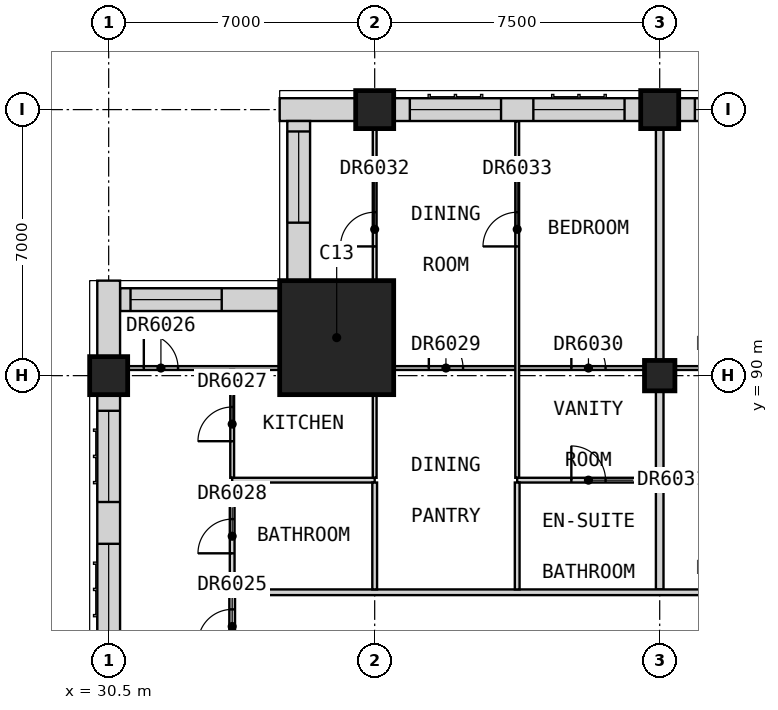
"""IFC4 building model, lengths in metres.
Left out: names, types, materials, properties, quantities, classifications, styles, units other than length and angle.
Written with IfcOpenShell. Run it as: python <this file> out.ifc"""

import sys

from ifc_helpers import new_model, si_unit, direction, frame, frame_2d, origin, origin_2d, place, context, subcontext, project, spatial, rectangle, extrude, element, fill, save


model = new_model("IFC4")
c1 = context("Model", 3, precision=1e-05, world=origin(), true_north=direction((0.0, 1.0)))
c2 = subcontext(c1, "Body", "Model", "MODEL_VIEW")
j1 = project(units=[si_unit("LENGTHUNIT", "METRE"), si_unit("PLANEANGLEUNIT", "RADIAN")], contexts=[c1])
p1 = place(None, origin())
s1 = spatial("IfcSite", under=j1, at=p1, CompositionType="ELEMENT")
p2 = place(p1, origin())
s2 = spatial("IfcBuilding", under=s1, at=p2, CompositionType="ELEMENT")
p3 = place(p2, frame((0.0, 0.0, 226.7)))
s3 = spatial("IfcBuildingStorey", under=s2, at=p3, CompositionType="ELEMENT", Elevation=226.7)
for number, where, z_axis, x_axis in (
    (1, (30.5, 90.0, 0.0), (0.0, 0.0, 1.0), (1.0, 0.0, 0.0)),
    (2, (37.5, 97.0, 0.0), (0.0, 0.0, 1.0), (1.0, 0.0, 0.0)),
):
    element("IfcColumn", number, at=place(p3, frame(where, z_axis=z_axis, x_axis=x_axis)), inside=s3, PredefinedType="COLUMN", context=c2, shape_type="SweptSolid", body=[
        extrude(rectangle(XDim=1.0, YDim=1.0, at=origin_2d()), origin(), (0.0, 0.0, 1.0), 3.5),
    ])
p4 = place(p3, frame((45.0, 90.0, 0.0), z_axis=(0.0, 0.0, 1.0), x_axis=(1.0, 0.0, 0.0)))
e3 = element("IfcColumn", 3, at=p4, inside=s3, PredefinedType="COLUMN", context=c2, shape_type="SweptSolid", body=[
    extrude(rectangle(XDim=0.8, YDim=0.8, at=origin_2d()), origin(), (0.0, 0.0, 1.0), 3.5),
])
p5 = place(p3, frame((45.0, 97.0, 0.0), z_axis=(0.0, 0.0, 1.0), x_axis=(1.0, 0.0, 0.0)))
e4 = element("IfcColumn", 4, at=p5, inside=s3, PredefinedType="COLUMN", context=c2, shape_type="SweptSolid", body=[
    extrude(rectangle(XDim=1.0, YDim=1.0, at=origin_2d()), origin(), (0.0, 0.0, 1.0), 3.5),
])
p6 = place(p3, frame((36.5, 91.0, 0.0), z_axis=(0.0, 0.0, 1.0), x_axis=(1.0, 0.0, 0.0)))
e5 = element("IfcColumn", 5, at=p6, inside=s3, PredefinedType="COLUMN", context=c2, shape_type="SweptSolid", body=[
    extrude(rectangle(XDim=3.0, YDim=3.0, at=origin_2d()), origin(), (0.0, 0.0, 1.0), 3.5),
])
p7 = place(p3, frame((52.0, 97.0, 0.0), z_axis=(0.0, 0.0, 1.0), x_axis=(-1.0, 0.0, 0.0)))
e6 = element("IfcWall", 6, at=p7, inside=s3, PredefinedType="SOLIDWALL", context=c2, shape_type="SweptSolid", body=[
    extrude(rectangle(XDim=6.5, YDim=0.6, at=frame_2d((3.25, 0.0))), origin(), (0.0, 0.0, 1.0), 2.75),
])
p8 = place(p7, frame((3.675, 0.0, 0.8)))
e7 = element("IfcOpeningElement", 7, at=p8, cuts=e6, PredefinedType="OPENING", context=c2, shape_type="SweptSolid", body=[
    extrude(rectangle(XDim=2.4, YDim=1.8, at=frame_2d((1.2, 0.9))), frame((0.0, 0.31, 0.0), z_axis=(0.0, -1.0, 0.0), x_axis=(1.0, 0.0, 0.0)), (0.0, 0.0, 1.0), 0.62),
])
p9 = place(p7, frame((0.425, 0.0, 0.8)))
e8 = element("IfcOpeningElement", 8, at=p9, cuts=e6, PredefinedType="OPENING", context=c2, shape_type="SweptSolid", body=[
    extrude(rectangle(XDim=2.4, YDim=1.8, at=frame_2d((1.2, 0.9))), frame((0.0, 0.31, 0.0), z_axis=(0.0, -1.0, 0.0), x_axis=(1.0, 0.0, 0.0)), (0.0, 0.0, 1.0), 0.62),
])
p10 = place(p3, frame((44.5, 97.0, 0.0), z_axis=(0.0, 0.0, 1.0), x_axis=(-1.0, 0.0, 0.0)))
e9 = element("IfcWall", 9, at=p10, inside=s3, PredefinedType="SOLIDWALL", context=c2, shape_type="SweptSolid", body=[
    extrude(rectangle(XDim=6.5, YDim=0.6, at=frame_2d((3.25, 0.0))), origin(), (0.0, 0.0, 1.0), 2.75),
])
p11 = place(p10, frame((3.675, 0.0, 0.8)))
e10 = element("IfcOpeningElement", 10, at=p11, cuts=e9, PredefinedType="OPENING", context=c2, shape_type="SweptSolid", body=[
    extrude(rectangle(XDim=2.4, YDim=1.8, at=frame_2d((1.2, 0.9))), frame((0.0, 0.31, 0.0), z_axis=(0.0, -1.0, 0.0), x_axis=(1.0, 0.0, 0.0)), (0.0, 0.0, 1.0), 0.62),
])
p12 = place(p10, frame((0.425, 0.0, 0.8)))
e11 = element("IfcOpeningElement", 11, at=p12, cuts=e9, PredefinedType="OPENING", context=c2, shape_type="SweptSolid", body=[
    extrude(rectangle(XDim=2.4, YDim=1.8, at=frame_2d((1.2, 0.9))), frame((0.0, 0.31, 0.0), z_axis=(0.0, -1.0, 0.0), x_axis=(1.0, 0.0, 0.0)), (0.0, 0.0, 1.0), 0.62),
])
p13 = place(p3, frame((37.0, 97.0, 0.0), z_axis=(0.0, 0.0, 1.0), x_axis=(-1.0, 0.0, 0.0)))
e12 = element("IfcWall", 12, at=p13, inside=s3, PredefinedType="SOLIDWALL", context=c2, shape_type="SweptSolid", body=[
    extrude(rectangle(XDim=2.0, YDim=0.6, at=frame_2d((1.0, 0.0))), origin(), (0.0, 0.0, 1.0), 3.25),
])
p14 = place(p3, frame((35.5, 96.7, 0.0), z_axis=(0.0, 0.0, 1.0), x_axis=(0.0, -1.0, 0.0)))
e13 = element("IfcWall", 13, at=p14, inside=s3, PredefinedType="SOLIDWALL", context=c2, shape_type="SweptSolid", body=[
    extrude(rectangle(XDim=4.2, YDim=0.6, at=frame_2d((2.1, 0.0))), origin(), (0.0, 0.0, 1.0), 3.25),
])
p15 = place(p14, frame((0.275, 0.0, 0.8)))
e14 = element("IfcOpeningElement", 14, at=p15, cuts=e13, PredefinedType="OPENING", context=c2, shape_type="SweptSolid", body=[
    extrude(rectangle(XDim=2.4, YDim=1.8, at=frame_2d((1.2, 0.9))), frame((0.0, 0.31, 0.0), z_axis=(0.0, -1.0, 0.0), x_axis=(1.0, 0.0, 0.0)), (0.0, 0.0, 1.0), 0.62),
])
p16 = place(p3, frame((35.0, 92.0, 0.0), z_axis=(0.0, 0.0, 1.0), x_axis=(-1.0, 0.0, 0.0)))
e15 = element("IfcWall", 15, at=p16, inside=s3, PredefinedType="SOLIDWALL", context=c2, shape_type="SweptSolid", body=[
    extrude(rectangle(XDim=4.2, YDim=0.6, at=frame_2d((2.1, 0.0))), origin(), (0.0, 0.0, 1.0), 3.25),
])
p17 = place(p16, frame((1.525, 0.0, 0.8)))
e16 = element("IfcOpeningElement", 16, at=p17, cuts=e15, PredefinedType="OPENING", context=c2, shape_type="SweptSolid", body=[
    extrude(rectangle(XDim=2.4, YDim=1.8, at=frame_2d((1.2, 0.9))), frame((0.0, 0.31, 0.0), z_axis=(0.0, -1.0, 0.0), x_axis=(1.0, 0.0, 0.0)), (0.0, 0.0, 1.0), 0.62),
])
p18 = place(p3, frame((30.5, 92.5, 0.0), z_axis=(0.0, 0.0, 1.0), x_axis=(0.0, -1.0, 0.0)))
e17 = element("IfcWall", 17, at=p18, inside=s3, PredefinedType="SOLIDWALL", context=c2, shape_type="SweptSolid", body=[
    extrude(rectangle(XDim=2.0, YDim=0.6, at=frame_2d((1.0, 0.0))), origin(), (0.0, 0.0, 1.0), 3.25),
])
p19 = place(p3, frame((30.5, 89.5, 0.0), z_axis=(0.0, 0.0, 1.0), x_axis=(0.0, -1.0, 0.0)))
e18 = element("IfcWall", 18, at=p19, inside=s3, PredefinedType="SOLIDWALL", context=c2, shape_type="SweptSolid", body=[
    extrude(rectangle(XDim=7.0, YDim=0.6, at=frame_2d((3.5, 0.0))), origin(), (0.0, 0.0, 1.0), 3.25),
])
p20 = place(p19, frame((3.925, 0.0, 0.8)))
e19 = element("IfcOpeningElement", 19, at=p20, cuts=e18, PredefinedType="OPENING", context=c2, shape_type="SweptSolid", body=[
    extrude(rectangle(XDim=2.4, YDim=1.8, at=frame_2d((1.2, 0.9))), frame((0.0, 0.31, 0.0), z_axis=(0.0, -1.0, 0.0), x_axis=(1.0, 0.0, 0.0)), (0.0, 0.0, 1.0), 0.62),
])
p21 = place(p19, frame((0.425, 0.0, 0.8)))
e20 = element("IfcOpeningElement", 20, at=p21, cuts=e18, PredefinedType="OPENING", context=c2, shape_type="SweptSolid", body=[
    extrude(rectangle(XDim=2.4, YDim=1.8, at=frame_2d((1.2, 0.9))), frame((0.0, 0.31, 0.0), z_axis=(0.0, -1.0, 0.0), x_axis=(1.0, 0.0, 0.0)), (0.0, 0.0, 1.0), 0.62),
])
p22 = place(p3, frame((45.0, 84.375, 0.0), z_axis=(0.0, 0.0, 1.0), x_axis=(0.0, 1.0, 0.0)))
e21 = element("IfcWall", 21, at=p22, inside=s3, PredefinedType="PARTITIONING", context=c2, shape_type="SweptSolid", body=[
    extrude(rectangle(XDim=13.125, YDim=0.2, at=frame_2d((6.562, 0.0))), origin(), (0.0, 0.0, 1.0), 3.25),
])
p23 = place(p3, frame((33.75, 84.3, 0.0), z_axis=(0.0, 0.0, 1.0), x_axis=(1.0, 0.0, 0.0)))
e22 = element("IfcWall", 22, at=p23, inside=s3, PredefinedType="PARTITIONING", context=c2, shape_type="SweptSolid", body=[
    extrude(rectangle(XDim=28.05, YDim=0.15, at=frame_2d((14.025, 0.0))), origin(), (0.0, 0.0, 1.0), 3.25),
])
p24 = place(p23, frame((12.675, 0.0, 0.0)))
e23 = element("IfcOpeningElement", 23, at=p24, cuts=e22, PredefinedType="OPENING", context=c2, shape_type="SweptSolid", body=[
    extrude(rectangle(XDim=0.9, YDim=2.1, at=frame_2d((0.45, 1.05))), frame((0.0, 0.085, 0.0), z_axis=(0.0, -1.0, 0.0), x_axis=(1.0, 0.0, 0.0)), (0.0, 0.0, 1.0), 0.17),
])
p25 = place(p23, frame((20.175, 0.0, 0.0)))
e24 = element("IfcOpeningElement", 24, at=p25, cuts=e22, PredefinedType="OPENING", context=c2, shape_type="SweptSolid", body=[
    extrude(rectangle(XDim=0.9, YDim=2.1, at=frame_2d((0.45, 1.05))), frame((0.0, 0.085, 0.0), z_axis=(0.0, -1.0, 0.0), x_axis=(1.0, 0.0, 0.0)), (0.0, 0.0, 1.0), 0.17),
])
p26 = place(p23, frame((26.65, 0.0, 0.0)))
e25 = element("IfcOpeningElement", 25, at=p26, cuts=e22, PredefinedType="OPENING", context=c2, shape_type="SweptSolid", body=[
    extrude(rectangle(XDim=1.0, YDim=2.1, at=frame_2d((0.5, 1.05))), frame((0.0, 0.085, 0.0), z_axis=(0.0, -1.0, 0.0), x_axis=(1.0, 0.0, 0.0)), (0.0, 0.0, 1.0), 0.17),
])
p27 = place(p3, frame((33.75, 82.5, 0.0), z_axis=(0.0, 0.0, 1.0), x_axis=(0.0, 1.0, 0.0)))
e26 = element("IfcWall", 26, at=p27, inside=s3, PredefinedType="PARTITIONING", context=c2, shape_type="SweptSolid", body=[
    extrude(rectangle(XDim=1.725, YDim=0.15, at=frame_2d((0.863, 0.0))), origin(), (0.0, 0.0, 1.0), 3.25),
])
p28 = place(p27, frame((0.45, 0.0, 0.0)))
e27 = element("IfcOpeningElement", 27, at=p28, cuts=e26, PredefinedType="OPENING", context=c2, shape_type="SweptSolid", body=[
    extrude(rectangle(XDim=0.9, YDim=2.1, at=frame_2d((0.45, 1.05))), frame((0.0, 0.085, 0.0), z_axis=(0.0, -1.0, 0.0), x_axis=(1.0, 0.0, 0.0)), (0.0, 0.0, 1.0), 0.17),
])
p29 = place(p3, frame((30.0, 90.2, 0.0), z_axis=(0.0, 0.0, 1.0), x_axis=(1.0, 0.0, 0.0)))
e28 = element("IfcWall", 28, at=p29, inside=s3, PredefinedType="PARTITIONING", context=c2, shape_type="SweptSolid", body=[
    extrude(rectangle(XDim=29.9, YDim=0.1, at=frame_2d((14.95, 0.0))), origin(), (0.0, 0.0, 1.0), 2.75),
])
p30 = place(p29, frame((1.425, 0.0, 0.0)))
e29 = element("IfcOpeningElement", 29, at=p30, cuts=e28, PredefinedType="OPENING", context=c2, shape_type="SweptSolid", body=[
    extrude(rectangle(XDim=0.9, YDim=2.1, at=frame_2d((0.45, 1.05))), frame((0.0, 0.06, 0.0), z_axis=(0.0, -1.0, 0.0), x_axis=(1.0, 0.0, 0.0)), (0.0, 0.0, 1.0), 0.12),
])
p31 = place(p29, frame((8.925, 0.0, 0.0)))
e30 = element("IfcOpeningElement", 30, at=p31, cuts=e28, PredefinedType="OPENING", context=c2, shape_type="SweptSolid", body=[
    extrude(rectangle(XDim=0.9, YDim=2.1, at=frame_2d((0.45, 1.05))), frame((0.0, 0.06, 0.0), z_axis=(0.0, -1.0, 0.0), x_axis=(1.0, 0.0, 0.0)), (0.0, 0.0, 1.0), 0.12),
])
p32 = place(p29, frame((12.675, 0.0, 0.0)))
e31 = element("IfcOpeningElement", 31, at=p32, cuts=e28, PredefinedType="OPENING", context=c2, shape_type="SweptSolid", body=[
    extrude(rectangle(XDim=0.9, YDim=2.1, at=frame_2d((0.45, 1.05))), frame((0.0, 0.06, 0.0), z_axis=(0.0, -1.0, 0.0), x_axis=(1.0, 0.0, 0.0)), (0.0, 0.0, 1.0), 0.12),
])
p33 = place(p29, frame((16.425, 0.0, 0.0)))
e32 = element("IfcOpeningElement", 32, at=p33, cuts=e28, PredefinedType="OPENING", context=c2, shape_type="SweptSolid", body=[
    extrude(rectangle(XDim=0.9, YDim=2.1, at=frame_2d((0.45, 1.05))), frame((0.0, 0.06, 0.0), z_axis=(0.0, -1.0, 0.0), x_axis=(1.0, 0.0, 0.0)), (0.0, 0.0, 1.0), 0.12),
])
p34 = place(p29, frame((23.925, 0.0, 0.0)))
e33 = element("IfcOpeningElement", 33, at=p34, cuts=e28, PredefinedType="OPENING", context=c2, shape_type="SweptSolid", body=[
    extrude(rectangle(XDim=0.9, YDim=2.1, at=frame_2d((0.45, 1.05))), frame((0.0, 0.06, 0.0), z_axis=(0.0, -1.0, 0.0), x_axis=(1.0, 0.0, 0.0)), (0.0, 0.0, 1.0), 0.12),
])
p35 = place(p3, frame((33.75, 87.312, 0.0), z_axis=(0.0, 0.0, 1.0), x_axis=(0.0, 1.0, 0.0)))
e34 = element("IfcWall", 34, at=p35, inside=s3, PredefinedType="PARTITIONING", context=c2, shape_type="SweptSolid", body=[
    extrude(rectangle(XDim=2.837, YDim=0.1, at=frame_2d((1.419, 0.0))), origin(), (0.0, 0.0, 1.0), 3.25),
])
p36 = place(p35, frame((0.962, 0.0, 0.0)))
e35 = element("IfcOpeningElement", 35, at=p36, cuts=e34, PredefinedType="OPENING", context=c2, shape_type="SweptSolid", body=[
    extrude(rectangle(XDim=0.9, YDim=2.1, at=frame_2d((0.45, 1.05))), frame((0.0, 0.06, 0.0), z_axis=(0.0, -1.0, 0.0), x_axis=(1.0, 0.0, 0.0)), (0.0, 0.0, 1.0), 0.12),
])
p37 = place(p3, frame((37.5, 87.312, 0.0), z_axis=(0.0, 0.0, 1.0), x_axis=(0.0, 1.0, 0.0)))
e36 = element("IfcWall", 36, at=p37, inside=s3, PredefinedType="PARTITIONING", context=c2, shape_type="SweptSolid", body=[
    extrude(rectangle(XDim=10.188, YDim=0.1, at=frame_2d((5.094, 0.0))), origin(), (0.0, 0.0, 1.0), 2.75),
])
p38 = place(p37, frame((6.087, 0.0, 0.0)))
e37 = element("IfcOpeningElement", 37, at=p38, cuts=e36, PredefinedType="OPENING", context=c2, shape_type="SweptSolid", body=[
    extrude(rectangle(XDim=0.9, YDim=2.1, at=frame_2d((0.45, 1.05))), frame((0.0, 0.06, 0.0), z_axis=(0.0, -1.0, 0.0), x_axis=(1.0, 0.0, 0.0)), (0.0, 0.0, 1.0), 0.12),
])
p39 = place(p3, frame((41.25, 87.312, 0.0), z_axis=(0.0, 0.0, 1.0), x_axis=(0.0, 1.0, 0.0)))
e38 = element("IfcWall", 38, at=p39, inside=s3, PredefinedType="PARTITIONING", context=c2, shape_type="SweptSolid", body=[
    extrude(rectangle(XDim=9.377, YDim=0.1, at=frame_2d((4.689, 0.0))), origin(), (0.0, 0.0, 1.0), 3.25),
])
p40 = place(p39, frame((6.087, 0.0, 0.0)))
e39 = element("IfcOpeningElement", 39, at=p40, cuts=e38, PredefinedType="OPENING", context=c2, shape_type="SweptSolid", body=[
    extrude(rectangle(XDim=0.9, YDim=2.1, at=frame_2d((0.45, 1.05))), frame((0.0, 0.06, 0.0), z_axis=(0.0, -1.0, 0.0), x_axis=(1.0, 0.0, 0.0)), (0.0, 0.0, 1.0), 0.12),
])
p41 = place(p3, frame((33.75, 87.25, 0.0), z_axis=(0.0, 0.0, 1.0), x_axis=(1.0, 0.0, 0.0)))
e40 = element("IfcWall", 40, at=p41, inside=s3, PredefinedType="PARTITIONING", context=c2, shape_type="SweptSolid", body=[
    extrude(rectangle(XDim=3.75, YDim=0.125, at=frame_2d((1.875, 0.0))), origin(), (0.0, 0.0, 1.0), 3.25),
])
p42 = place(p3, frame((41.25, 87.25, 0.0), z_axis=(0.0, 0.0, 1.0), x_axis=(1.0, 0.0, 0.0)))
e41 = element("IfcWall", 41, at=p42, inside=s3, PredefinedType="PARTITIONING", context=c2, shape_type="SweptSolid", body=[
    extrude(rectangle(XDim=3.65, YDim=0.125, at=frame_2d((1.825, 0.0))), origin(), (0.0, 0.0, 1.0), 3.25),
])
p43 = place(p42, frame((1.425, 0.0, 0.0)))
e42 = element("IfcOpeningElement", 42, at=p43, cuts=e41, PredefinedType="OPENING", context=c2, shape_type="SweptSolid", body=[
    extrude(rectangle(XDim=0.9, YDim=2.1, at=frame_2d((0.45, 1.05))), frame((0.0, 0.073, 0.0), z_axis=(0.0, -1.0, 0.0), x_axis=(1.0, 0.0, 0.0)), (0.0, 0.0, 1.0), 0.145),
])
p44 = place(p3, frame((33.75, 84.375, 0.0), z_axis=(0.0, 0.0, 1.0), x_axis=(0.0, 1.0, 0.0)))
e43 = element("IfcWall", 43, at=p44, inside=s3, PredefinedType="PARTITIONING", context=c2, shape_type="SweptSolid", body=[
    extrude(rectangle(XDim=2.812, YDim=0.125, at=frame_2d((1.406, 0.0))), origin(), (0.0, 0.0, 1.0), 3.25),
])
p45 = place(p44, frame((0.95, 0.0, 0.0)))
e44 = element("IfcOpeningElement", 44, at=p45, cuts=e43, PredefinedType="OPENING", context=c2, shape_type="SweptSolid", body=[
    extrude(rectangle(XDim=0.9, YDim=2.1, at=frame_2d((0.45, 1.05))), frame((0.0, 0.073, 0.0), z_axis=(0.0, -1.0, 0.0), x_axis=(1.0, 0.0, 0.0)), (0.0, 0.0, 1.0), 0.145),
])
for number, where, z_axis, x_axis in (
    (45, (37.5, 84.375, 0.0), (0.0, 0.0, 1.0), (0.0, 1.0, 0.0)),
    (46, (41.25, 84.375, 0.0), (0.0, 0.0, 1.0), (0.0, 1.0, 0.0)),
):
    element("IfcWall", number, at=place(p3, frame(where, z_axis=z_axis, x_axis=x_axis)), inside=s3, PredefinedType="PARTITIONING", context=c2, shape_type="SweptSolid", body=[
        extrude(rectangle(XDim=2.812, YDim=0.125, at=frame_2d((1.406, 0.0))), origin(), (0.0, 0.0, 1.0), 3.25),
    ])
p46 = place(p8, origin())
e47 = element("IfcWindow", 47, at=p46, inside=s3, PartitioningType="SINGLE_PANEL", PredefinedType="WINDOW", context=c2, shape_type="SweptSolid", body=[
    extrude(rectangle(XDim=2.4, YDim=1.8, at=frame_2d((1.2, 0.9))), frame((0.0, -0.07, 0.0), z_axis=(0.0, -1.0, 0.0), x_axis=(1.0, 0.0, 0.0)), (0.0, 0.0, 1.0), 0.06),
])
fill(e7, e47)
p47 = place(p11, origin())
e48 = element("IfcWindow", 48, at=p47, inside=s3, PartitioningType="SINGLE_PANEL", PredefinedType="WINDOW", context=c2, shape_type="SweptSolid", body=[
    extrude(rectangle(XDim=2.4, YDim=1.8, at=frame_2d((1.2, 0.9))), frame((0.0, -0.07, 0.0), z_axis=(0.0, -1.0, 0.0), x_axis=(1.0, 0.0, 0.0)), (0.0, 0.0, 1.0), 0.06),
])
fill(e10, e48)
p48 = place(p12, origin())
e49 = element("IfcWindow", 49, at=p48, inside=s3, PartitioningType="SINGLE_PANEL", PredefinedType="WINDOW", context=c2, shape_type="SweptSolid", body=[
    extrude(rectangle(XDim=2.4, YDim=1.8, at=frame_2d((1.2, 0.9))), frame((0.0, -0.07, 0.0), z_axis=(0.0, -1.0, 0.0), x_axis=(1.0, 0.0, 0.0)), (0.0, 0.0, 1.0), 0.06),
])
fill(e11, e49)
p49 = place(p15, origin())
e50 = element("IfcWindow", 50, at=p49, inside=s3, PartitioningType="SINGLE_PANEL", PredefinedType="WINDOW", context=c2, shape_type="SweptSolid", body=[
    extrude(rectangle(XDim=2.4, YDim=1.8, at=frame_2d((1.2, 0.9))), frame((0.0, -0.07, 0.0), z_axis=(0.0, -1.0, 0.0), x_axis=(1.0, 0.0, 0.0)), (0.0, 0.0, 1.0), 0.06),
])
fill(e14, e50)
p50 = place(p17, origin())
e51 = element("IfcWindow", 51, at=p50, inside=s3, PartitioningType="SINGLE_PANEL", PredefinedType="WINDOW", context=c2, shape_type="SweptSolid", body=[
    extrude(rectangle(XDim=2.4, YDim=1.8, at=frame_2d((1.2, 0.9))), frame((0.0, -0.07, 0.0), z_axis=(0.0, -1.0, 0.0), x_axis=(1.0, 0.0, 0.0)), (0.0, 0.0, 1.0), 0.06),
])
fill(e16, e51)
p51 = place(p20, origin())
e52 = element("IfcWindow", 52, at=p51, inside=s3, PartitioningType="SINGLE_PANEL", PredefinedType="WINDOW", context=c2, shape_type="SweptSolid", body=[
    extrude(rectangle(XDim=2.4, YDim=1.8, at=frame_2d((1.2, 0.9))), frame((0.0, -0.07, 0.0), z_axis=(0.0, -1.0, 0.0), x_axis=(1.0, 0.0, 0.0)), (0.0, 0.0, 1.0), 0.06),
])
fill(e19, e52)
p52 = place(p21, origin())
e53 = element("IfcWindow", 53, at=p52, inside=s3, PartitioningType="SINGLE_PANEL", PredefinedType="WINDOW", context=c2, shape_type="SweptSolid", body=[
    extrude(rectangle(XDim=2.4, YDim=1.8, at=frame_2d((1.2, 0.9))), frame((0.0, -0.07, 0.0), z_axis=(0.0, -1.0, 0.0), x_axis=(1.0, 0.0, 0.0)), (0.0, 0.0, 1.0), 0.06),
])
fill(e20, e53)
p53 = place(p28, origin())
e54 = element("IfcDoor", 54, at=p53, inside=s3, OperationType="SINGLE_SWING_LEFT", PredefinedType="DOOR", context=c2, shape_type="SweptSolid", body=[
    extrude(rectangle(XDim=0.9, YDim=2.1, at=frame_2d((0.45, 1.05))), frame((0.0, 0.025, 0.0), z_axis=(0.0, -1.0, 0.0), x_axis=(1.0, 0.0, 0.0)), (0.0, 0.0, 1.0), 0.05),
])
fill(e27, e54)
p54 = place(p30, origin())
e55 = element("IfcDoor", 55, at=p54, inside=s3, OperationType="SINGLE_SWING_RIGHT", PredefinedType="DOOR", context=c2, shape_type="SweptSolid", body=[
    extrude(rectangle(XDim=0.9, YDim=2.1, at=frame_2d((0.45, 1.05))), frame((0.0, 0.025, 0.0), z_axis=(0.0, -1.0, 0.0), x_axis=(1.0, 0.0, 0.0)), (0.0, 0.0, 1.0), 0.05),
])
fill(e29, e55)
p55 = place(p36, origin())
e56 = element("IfcDoor", 56, at=p55, inside=s3, OperationType="SINGLE_SWING_RIGHT", PredefinedType="DOOR", context=c2, shape_type="SweptSolid", body=[
    extrude(rectangle(XDim=0.9, YDim=2.1, at=frame_2d((0.45, 1.05))), frame((0.0, 0.025, 0.0), z_axis=(0.0, -1.0, 0.0), x_axis=(1.0, 0.0, 0.0)), (0.0, 0.0, 1.0), 0.05),
])
fill(e35, e56)
p56 = place(p45, origin())
e57 = element("IfcDoor", 57, at=p56, inside=s3, OperationType="SINGLE_SWING_RIGHT", PredefinedType="DOOR", context=c2, shape_type="SweptSolid", body=[
    extrude(rectangle(XDim=0.9, YDim=2.1, at=frame_2d((0.45, 1.05))), frame((0.0, 0.025, 0.0), z_axis=(0.0, -1.0, 0.0), x_axis=(1.0, 0.0, 0.0)), (0.0, 0.0, 1.0), 0.05),
])
fill(e44, e57)
p57 = place(p31, origin())
e58 = element("IfcDoor", 58, at=p57, inside=s3, OperationType="SINGLE_SWING_RIGHT", PredefinedType="DOOR", context=c2, shape_type="SweptSolid", body=[
    extrude(rectangle(XDim=0.9, YDim=2.1, at=frame_2d((0.45, 1.05))), frame((0.0, 0.025, 0.0), z_axis=(0.0, -1.0, 0.0), x_axis=(1.0, 0.0, 0.0)), (0.0, 0.0, 1.0), 0.05),
])
fill(e30, e58)
p58 = place(p32, origin())
e59 = element("IfcDoor", 59, at=p58, inside=s3, OperationType="SINGLE_SWING_RIGHT", PredefinedType="DOOR", context=c2, shape_type="SweptSolid", body=[
    extrude(rectangle(XDim=0.9, YDim=2.1, at=frame_2d((0.45, 1.05))), frame((0.0, 0.025, 0.0), z_axis=(0.0, -1.0, 0.0), x_axis=(1.0, 0.0, 0.0)), (0.0, 0.0, 1.0), 0.05),
])
fill(e31, e59)
p59 = place(p43, origin())
e60 = element("IfcDoor", 60, at=p59, inside=s3, OperationType="SINGLE_SWING_RIGHT", PredefinedType="DOOR", context=c2, shape_type="SweptSolid", body=[
    extrude(rectangle(XDim=0.9, YDim=2.1, at=frame_2d((0.45, 1.05))), frame((0.0, 0.025, 0.0), z_axis=(0.0, -1.0, 0.0), x_axis=(1.0, 0.0, 0.0)), (0.0, 0.0, 1.0), 0.05),
])
fill(e42, e60)
p60 = place(p38, origin())
e61 = element("IfcDoor", 61, at=p60, inside=s3, OperationType="SINGLE_SWING_LEFT", PredefinedType="DOOR", context=c2, shape_type="SweptSolid", body=[
    extrude(rectangle(XDim=0.9, YDim=2.1, at=frame_2d((0.45, 1.05))), frame((0.0, 0.025, 0.0), z_axis=(0.0, -1.0, 0.0), x_axis=(1.0, 0.0, 0.0)), (0.0, 0.0, 1.0), 0.05),
])
fill(e37, e61)
p61 = place(p40, origin())
e62 = element("IfcDoor", 62, at=p61, inside=s3, OperationType="SINGLE_SWING_LEFT", PredefinedType="DOOR", context=c2, shape_type="SweptSolid", body=[
    extrude(rectangle(XDim=0.9, YDim=2.1, at=frame_2d((0.45, 1.05))), frame((0.0, 0.025, 0.0), z_axis=(0.0, -1.0, 0.0), x_axis=(1.0, 0.0, 0.0)), (0.0, 0.0, 1.0), 0.05),
])
fill(e39, e62)
save(model, sys.argv[1])
